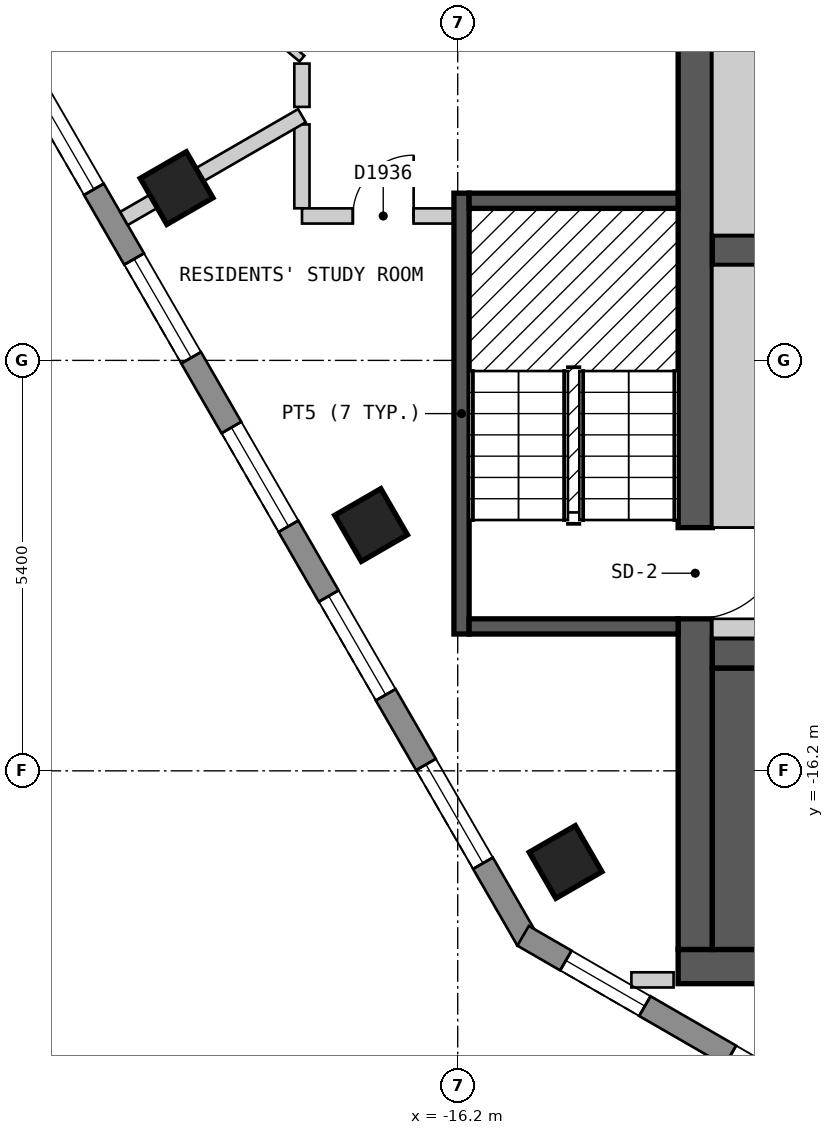
"""IFC4 building model, lengths in metres.
Left out: names, types, materials, properties, quantities, classifications, styles, units other than length and angle.
Written with IfcOpenShell. Run it as: python <this file> out.ifc"""

import sys

from ifc_helpers import new_model, si_unit, direction, frame, frame_2d, origin, origin_2d, place, context, subcontext, project, spatial, polyline, rectangle, outline, extrude, element, fill, save


model = new_model("IFC4")
c1 = context("Model", 3, precision=1e-05, world=origin(), true_north=direction((0.0, 1.0)))
c2 = subcontext(c1, "Body", "Model", "MODEL_VIEW")
j1 = project(units=[si_unit("LENGTHUNIT", "METRE"), si_unit("PLANEANGLEUNIT", "RADIAN")], contexts=[c1])
p1 = place(None, origin())
s1 = spatial("IfcSite", under=j1, at=p1, CompositionType="ELEMENT")
p2 = place(p1, origin())
s2 = spatial("IfcBuilding", under=s1, at=p2, CompositionType="ELEMENT")
p3 = place(p2, frame((0.0, 0.0, 220.8)))
s3 = spatial("IfcBuildingStorey", under=s2, at=p3, CompositionType="ELEMENT", Elevation=220.8)
for number, where, z_axis, x_axis in (
    (1, (-19.899, -8.533, 0.0), (0.0, 0.0, 1.0), (0.5, -0.866, 0.0)),
    (2, (-17.34, -12.966, 0.0), (0.0, 0.0, 1.0), (0.5, -0.866, 0.0)),
    (3, (-14.781, -17.399, 0.0), (0.0, 0.0, 1.0), (0.5, -0.866, 0.0)),
):
    element("IfcColumn", number, at=place(p3, frame(where, z_axis=z_axis, x_axis=x_axis)), inside=s3, PredefinedType="COLUMN", context=c2, shape_type="SweptSolid", body=[
        extrude(rectangle(XDim=0.7, YDim=0.7, at=origin_2d()), origin(), (0.0, 0.0, 1.0), 3.0),
    ])
p4 = place(p3, frame((-13.3, -18.775, 0.0), z_axis=(0.0, 0.0, 1.0), x_axis=(1.0, 0.0, 0.0)))
e4 = element("IfcWall", 4, at=p4, inside=s3, PredefinedType="SHEAR", context=c2, shape_type="SweptSolid", body=[
    extrude(rectangle(XDim=26.6, YDim=0.45, at=frame_2d((13.3, 0.0))), origin(), (0.0, 0.0, 1.0), 2.7),
])
p5 = place(p4, frame((9.3, 0.0, 0.0)))
e5 = element("IfcOpeningElement", 5, at=p5, cuts=e4, PredefinedType="OPENING", context=c2, shape_type="SweptSolid", body=[
    extrude(rectangle(XDim=0.9, YDim=2.1, at=frame_2d((0.45, 1.05))), frame((0.0, 0.235, 0.0), z_axis=(0.0, -1.0, 0.0), x_axis=(1.0, 0.0, 0.0)), (0.0, 0.0, 1.0), 0.47),
])
p6 = place(p3, frame((-13.075, -18.55, 0.0), z_axis=(0.0, 0.0, 1.0), x_axis=(0.0, 1.0, 0.0)))
e6 = element("IfcWall", 6, at=p6, inside=s3, PredefinedType="SHEAR", context=c2, shape_type="SweptSolid", body=[
    extrude(rectangle(XDim=13.1, YDim=0.45, at=frame_2d((6.55, 0.0))), origin(), (0.0, 0.0, 1.0), 2.7),
])
p7 = place(p6, frame((4.35, 0.0, 0.0)))
e7 = element("IfcOpeningElement", 7, at=p7, cuts=e6, PredefinedType="OPENING", context=c2, shape_type="SweptSolid", body=[
    extrude(rectangle(XDim=1.2, YDim=2.1, at=frame_2d((0.6, 1.05))), frame((0.0, 0.235, 0.0), z_axis=(0.0, -1.0, 0.0), x_axis=(1.0, 0.0, 0.0)), (0.0, 0.0, 1.0), 0.47),
])
p8 = place(p3, frame((-12.85, -14.65, 0.0), z_axis=(0.0, 0.0, 1.0), x_axis=(1.0, 0.0, 0.0)))
e8 = element("IfcWall", 8, at=p8, inside=s3, PredefinedType="SHEAR", context=c2, shape_type="SweptSolid", body=[
    extrude(rectangle(XDim=25.7, YDim=0.4, at=frame_2d((12.85, 0.0))), origin(), (0.0, 0.0, 1.0), 2.7),
])
p9 = place(p8, frame((2.05, 0.0, 0.0), z_axis=(0.0, 0.0, 1.0), x_axis=(-1.0, 0.0, 0.0)))
e9 = element("IfcOpeningElement", 9, at=p9, cuts=e8, PredefinedType="OPENING", context=c2, shape_type="SweptSolid", body=[
    extrude(rectangle(XDim=1.2, YDim=2.1, at=frame_2d((0.6, 1.05))), frame((0.0, 0.21, 0.0), z_axis=(0.0, -1.0, 0.0), x_axis=(1.0, 0.0, 0.0)), (0.0, 0.0, 1.0), 0.42),
])
p10 = place(p8, frame((24.9, 0.0, 0.0), z_axis=(0.0, 0.0, 1.0), x_axis=(-1.0, 0.0, 0.0)))
e10 = element("IfcOpeningElement", 10, at=p10, cuts=e8, PredefinedType="OPENING", context=c2, shape_type="SweptSolid", body=[
    extrude(rectangle(XDim=1.2, YDim=2.1, at=frame_2d((0.6, 1.05))), frame((0.0, 0.21, 0.0), z_axis=(0.0, -1.0, 0.0), x_axis=(1.0, 0.0, 0.0)), (0.0, 0.0, 1.0), 0.42),
])
p11 = place(p8, frame((8.75, 0.0, 0.0), z_axis=(0.0, 0.0, 1.0), x_axis=(-1.0, 0.0, 0.0)))
e11 = element("IfcOpeningElement", 11, at=p11, cuts=e8, PredefinedType="OPENING", context=c2, shape_type="SweptSolid", body=[
    extrude(rectangle(XDim=1.0, YDim=2.1, at=frame_2d((0.5, 1.05))), frame((0.0, 0.21, 0.0), z_axis=(0.0, -1.0, 0.0), x_axis=(1.0, 0.0, 0.0)), (0.0, 0.0, 1.0), 0.42),
])
p12 = place(p8, frame((11.5, 0.0, 0.0), z_axis=(0.0, 0.0, 1.0), x_axis=(-1.0, 0.0, 0.0)))
e12 = element("IfcOpeningElement", 12, at=p12, cuts=e8, PredefinedType="OPENING", context=c2, shape_type="SweptSolid", body=[
    extrude(rectangle(XDim=0.9, YDim=2.1, at=frame_2d((0.45, 1.05))), frame((0.0, 0.21, 0.0), z_axis=(0.0, -1.0, 0.0), x_axis=(1.0, 0.0, 0.0)), (0.0, 0.0, 1.0), 0.42),
])
p13 = place(p8, frame((14.3, 0.0, 0.0), z_axis=(0.0, 0.0, 1.0), x_axis=(-1.0, 0.0, 0.0)))
e13 = element("IfcOpeningElement", 13, at=p13, cuts=e8, PredefinedType="OPENING", context=c2, shape_type="SweptSolid", body=[
    extrude(rectangle(XDim=1.0, YDim=2.1, at=frame_2d((0.5, 1.05))), frame((0.0, 0.21, 0.0), z_axis=(0.0, -1.0, 0.0), x_axis=(1.0, 0.0, 0.0)), (0.0, 0.0, 1.0), 0.42),
])
p14 = place(p8, frame((17.9, 0.0, 0.0), z_axis=(0.0, 0.0, 1.0), x_axis=(-1.0, 0.0, 0.0)))
e14 = element("IfcOpeningElement", 14, at=p14, cuts=e8, PredefinedType="OPENING", context=c2, shape_type="SweptSolid", body=[
    extrude(rectangle(XDim=1.0, YDim=2.1, at=frame_2d((0.5, 1.05))), frame((0.0, 0.21, 0.0), z_axis=(0.0, -1.0, 0.0), x_axis=(1.0, 0.0, 0.0)), (0.0, 0.0, 1.0), 0.42),
])
p15 = place(p3, frame((-12.85, -9.35, 0.0), z_axis=(0.0, 0.0, 1.0), x_axis=(1.0, 0.0, 0.0)))
e15 = element("IfcWall", 15, at=p15, inside=s3, PredefinedType="SHEAR", context=c2, shape_type="SweptSolid", body=[
    extrude(rectangle(XDim=23.05, YDim=0.4, at=frame_2d((11.525, 0.0))), origin(), (0.0, 0.0, 1.0), 2.7),
])
p16 = place(p15, frame((1.45, 0.0, 0.0)))
e16 = element("IfcOpeningElement", 16, at=p16, cuts=e15, PredefinedType="OPENING", context=c2, shape_type="SweptSolid", body=[
    extrude(rectangle(XDim=1.1, YDim=2.1, at=frame_2d((0.55, 1.05))), frame((0.0, 0.21, 0.0), z_axis=(0.0, -1.0, 0.0), x_axis=(1.0, 0.0, 0.0)), (0.0, 0.0, 1.0), 0.42),
])
p17 = place(p15, frame((4.25, 0.0, 0.0)))
e17 = element("IfcOpeningElement", 17, at=p17, cuts=e15, PredefinedType="OPENING", context=c2, shape_type="SweptSolid", body=[
    extrude(rectangle(XDim=1.1, YDim=2.1, at=frame_2d((0.55, 1.05))), frame((0.0, 0.21, 0.0), z_axis=(0.0, -1.0, 0.0), x_axis=(1.0, 0.0, 0.0)), (0.0, 0.0, 1.0), 0.42),
])
p18 = place(p15, frame((7.05, 0.0, 0.0)))
e18 = element("IfcOpeningElement", 18, at=p18, cuts=e15, PredefinedType="OPENING", context=c2, shape_type="SweptSolid", body=[
    extrude(rectangle(XDim=1.1, YDim=2.1, at=frame_2d((0.55, 1.05))), frame((0.0, 0.21, 0.0), z_axis=(0.0, -1.0, 0.0), x_axis=(1.0, 0.0, 0.0)), (0.0, 0.0, 1.0), 0.42),
])
p19 = place(p15, frame((9.35, 0.0, 0.0)))
e19 = element("IfcOpeningElement", 19, at=p19, cuts=e15, PredefinedType="OPENING", context=c2, shape_type="SweptSolid", body=[
    extrude(rectangle(XDim=1.1, YDim=2.1, at=frame_2d((0.55, 1.05))), frame((0.0, 0.21, 0.0), z_axis=(0.0, -1.0, 0.0), x_axis=(1.0, 0.0, 0.0)), (0.0, 0.0, 1.0), 0.42),
])
p20 = place(p15, frame((11.65, 0.0, 0.0)))
e20 = element("IfcOpeningElement", 20, at=p20, cuts=e15, PredefinedType="OPENING", context=c2, shape_type="SweptSolid", body=[
    extrude(rectangle(XDim=1.1, YDim=2.1, at=frame_2d((0.55, 1.05))), frame((0.0, 0.21, 0.0), z_axis=(0.0, -1.0, 0.0), x_axis=(1.0, 0.0, 0.0)), (0.0, 0.0, 1.0), 0.42),
])
p21 = place(p15, frame((13.95, 0.0, 0.0)))
e21 = element("IfcOpeningElement", 21, at=p21, cuts=e15, PredefinedType="OPENING", context=c2, shape_type="SweptSolid", body=[
    extrude(rectangle(XDim=1.1, YDim=2.1, at=frame_2d((0.55, 1.05))), frame((0.0, 0.21, 0.0), z_axis=(0.0, -1.0, 0.0), x_axis=(1.0, 0.0, 0.0)), (0.0, 0.0, 1.0), 0.42),
])
p22 = place(p15, frame((16.25, 0.0, 0.0)))
e22 = element("IfcOpeningElement", 22, at=p22, cuts=e15, PredefinedType="OPENING", context=c2, shape_type="SweptSolid", body=[
    extrude(rectangle(XDim=1.1, YDim=2.1, at=frame_2d((0.55, 1.05))), frame((0.0, 0.21, 0.0), z_axis=(0.0, -1.0, 0.0), x_axis=(1.0, 0.0, 0.0)), (0.0, 0.0, 1.0), 0.42),
])
p23 = place(p15, frame((18.55, 0.0, 0.0)))
e23 = element("IfcOpeningElement", 23, at=p23, cuts=e15, PredefinedType="OPENING", context=c2, shape_type="SweptSolid", body=[
    extrude(rectangle(XDim=1.1, YDim=2.1, at=frame_2d((0.55, 1.05))), frame((0.0, 0.21, 0.0), z_axis=(0.0, -1.0, 0.0), x_axis=(1.0, 0.0, 0.0)), (0.0, 0.0, 1.0), 0.42),
])
p24 = place(p15, frame((20.95, 0.0, 0.0)))
e24 = element("IfcOpeningElement", 24, at=p24, cuts=e15, PredefinedType="OPENING", context=c2, shape_type="SweptSolid", body=[
    extrude(rectangle(XDim=1.1, YDim=2.1, at=frame_2d((0.55, 1.05))), frame((0.0, 0.21, 0.0), z_axis=(0.0, -1.0, 0.0), x_axis=(1.0, 0.0, 0.0)), (0.0, 0.0, 1.0), 0.42),
])
p25 = place(p3, frame((-23.599, -4.025, 0.0), z_axis=(0.0, 0.0, 1.0), x_axis=(0.500012653391, -0.866018098222, 0.0)))
e25 = element("IfcWall", 25, at=p25, inside=s3, PredefinedType="SOLIDWALL", context=c2, shape_type="SweptSolid", body=[
    extrude(outline(polyline([(0.0, -0.15), (16.628, -0.15), (16.548, 0.15), (0.08, 0.15), (0.0, -0.15)])), origin(), (0.0, 0.0, 1.0), 2.7),
])
p26 = place(p25, frame((1.164, 0.0, 0.15)))
e26 = element("IfcOpeningElement", 26, at=p26, cuts=e25, PredefinedType="OPENING", context=c2, shape_type="SweptSolid", body=[
    extrude(rectangle(XDim=1.5, YDim=2.1, at=frame_2d((0.75, 1.05))), frame((0.0, 0.16, 0.0), z_axis=(0.0, -1.0, 0.0), x_axis=(1.0, 0.0, 0.0)), (0.0, 0.0, 1.0), 0.32),
])
p27 = place(p25, frame((3.724, 0.0, 0.15)))
e27 = element("IfcOpeningElement", 27, at=p27, cuts=e25, PredefinedType="OPENING", context=c2, shape_type="SweptSolid", body=[
    extrude(rectangle(XDim=1.5, YDim=2.1, at=frame_2d((0.75, 1.05))), frame((0.0, 0.16, 0.0), z_axis=(0.0, -1.0, 0.0), x_axis=(1.0, 0.0, 0.0)), (0.0, 0.0, 1.0), 0.32),
])
p28 = place(p25, frame((6.283, 0.0, 0.15)))
e28 = element("IfcOpeningElement", 28, at=p28, cuts=e25, PredefinedType="OPENING", context=c2, shape_type="SweptSolid", body=[
    extrude(rectangle(XDim=1.5, YDim=2.1, at=frame_2d((0.75, 1.05))), frame((0.0, 0.16, 0.0), z_axis=(0.0, -1.0, 0.0), x_axis=(1.0, 0.0, 0.0)), (0.0, 0.0, 1.0), 0.32),
])
p29 = place(p25, frame((8.843, 0.0, 0.15)))
e29 = element("IfcOpeningElement", 29, at=p29, cuts=e25, PredefinedType="OPENING", context=c2, shape_type="SweptSolid", body=[
    extrude(rectangle(XDim=1.5, YDim=2.1, at=frame_2d((0.75, 1.05))), frame((0.0, 0.16, 0.0), z_axis=(0.0, -1.0, 0.0), x_axis=(1.0, 0.0, 0.0)), (0.0, 0.0, 1.0), 0.32),
])
p30 = place(p25, frame((11.403, 0.0, 0.15)))
e30 = element("IfcOpeningElement", 30, at=p30, cuts=e25, PredefinedType="OPENING", context=c2, shape_type="SweptSolid", body=[
    extrude(rectangle(XDim=1.5, YDim=2.1, at=frame_2d((0.75, 1.05))), frame((0.0, 0.16, 0.0), z_axis=(0.0, -1.0, 0.0), x_axis=(1.0, 0.0, 0.0)), (0.0, 0.0, 1.0), 0.32),
])
p31 = place(p25, frame((13.962, 0.0, 0.15)))
e31 = element("IfcOpeningElement", 31, at=p31, cuts=e25, PredefinedType="OPENING", context=c2, shape_type="SweptSolid", body=[
    extrude(rectangle(XDim=1.5, YDim=2.1, at=frame_2d((0.75, 1.05))), frame((0.0, 0.16, 0.0), z_axis=(0.0, -1.0, 0.0), x_axis=(1.0, 0.0, 0.0)), (0.0, 0.0, 1.0), 0.32),
])
p32 = place(p3, frame((-15.34, -18.37, 0.0), z_axis=(0.0, 0.0, 1.0), x_axis=(0.866022959057, -0.500004234368, 0.0)))
e32 = element("IfcWall", 32, at=p32, inside=s3, PredefinedType="SOLIDWALL", context=c2, shape_type="SweptSolid", body=[
    extrude(outline(polyline([(0.0, -0.15), (5.0, -0.15), (4.92, 0.15), (0.08, 0.15), (0.0, -0.15)])), origin(), (0.0, 0.0, 1.0), 2.7),
])
p33 = place(p32, frame((0.65, 0.0, 0.15)))
e33 = element("IfcOpeningElement", 33, at=p33, cuts=e32, PredefinedType="OPENING", context=c2, shape_type="SweptSolid", body=[
    extrude(rectangle(XDim=1.2, YDim=2.1, at=frame_2d((0.6, 1.05))), frame((0.0, 0.16, 0.0), z_axis=(0.0, -1.0, 0.0), x_axis=(1.0, 0.0, 0.0)), (0.0, 0.0, 1.0), 0.32),
])
p34 = place(p32, frame((3.15, 0.0, 0.15)))
e34 = element("IfcOpeningElement", 34, at=p34, cuts=e32, PredefinedType="OPENING", context=c2, shape_type="SweptSolid", body=[
    extrude(rectangle(XDim=1.2, YDim=2.1, at=frame_2d((0.6, 1.05))), frame((0.0, 0.16, 0.0), z_axis=(0.0, -1.0, 0.0), x_axis=(1.0, 0.0, 0.0)), (0.0, 0.0, 1.0), 0.32),
])
p35 = place(p3, frame((-18.25, -7.696, 0.0), z_axis=(0.0, 0.0, 1.0), x_axis=(0.0, -1.0, 0.0)))
e35 = element("IfcWall", 35, at=p35, inside=s3, PredefinedType="PARTITIONING", context=c2, shape_type="SweptSolid", body=[
    extrude(rectangle(XDim=1.103, YDim=0.2, at=frame_2d((0.552, 0.0))), origin(), (0.0, 0.0, 1.0), 2.7),
])
p36 = place(p3, frame((-18.249, -8.9, 0.0), z_axis=(0.0, 0.0, 1.0), x_axis=(1.0, 0.0, 0.0)))
e36 = element("IfcWall", 36, at=p36, inside=s3, PredefinedType="PARTITIONING", context=c2, shape_type="SweptSolid", body=[
    extrude(rectangle(XDim=2.199, YDim=0.2, at=frame_2d((1.1, 0.0))), origin(), (0.0, 0.0, 1.0), 2.7),
])
p37 = place(p36, frame((0.669, 0.0, 0.0)))
e37 = element("IfcOpeningElement", 37, at=p37, cuts=e36, PredefinedType="OPENING", context=c2, shape_type="SweptSolid", body=[
    extrude(rectangle(XDim=0.8, YDim=2.1, at=frame_2d((0.4, 1.05))), frame((0.0, 0.11, 0.0), z_axis=(0.0, -1.0, 0.0), x_axis=(1.0, 0.0, 0.0)), (0.0, 0.0, 1.0), 0.22),
])
p38 = place(p3, frame((-18.25, -7.465, 0.0), z_axis=(0.0, 0.0, 1.0), x_axis=(0.0, 1.0, 0.0)))
e38 = element("IfcWall", 38, at=p38, inside=s3, PredefinedType="PARTITIONING", context=c2, shape_type="SweptSolid", body=[
    extrude(rectangle(XDim=0.57, YDim=0.2, at=frame_2d((0.285, 0.0))), origin(), (0.0, 0.0, 1.0), 2.7),
])
p39 = place(p3, frame((-20.15, -5.223, 0.0), z_axis=(0.0, 0.0, 1.0), x_axis=(0.763471868926, -0.645841083672, 0.0)))
e39 = element("IfcWall", 39, at=p39, inside=s3, PredefinedType="PARTITIONING", context=c2, shape_type="SweptSolid", body=[
    extrude(rectangle(XDim=2.489, YDim=0.1, at=frame_2d((1.244, 0.0))), origin(), (0.0, 0.0, 1.0), 2.7),
])
p40 = place(p3, frame((-13.915, -18.95, 0.0), z_axis=(0.0, 0.0, 1.0), x_axis=(1.0, 0.0, 0.0)))
e40 = element("IfcWall", 40, at=p40, inside=s3, PredefinedType="PARTITIONING", context=c2, shape_type="SweptSolid", body=[
    extrude(rectangle(XDim=0.555, YDim=0.2, at=frame_2d((0.277, 0.0))), origin(), (0.0, 0.0, 1.0), 2.7),
])
p41 = place(p3, frame((-20.592, -8.933, 0.0), z_axis=(0.0, 0.0, 1.0), x_axis=(0.866045775131, 0.499964714133, 0.0)))
e41 = element("IfcWall", 41, at=p41, inside=s3, PredefinedType="PARTITIONING", context=c2, shape_type="SweptSolid", body=[
    extrude(rectangle(XDim=2.704, YDim=0.2, at=frame_2d((1.352, 0.0))), origin(), (0.0, 0.0, 1.0), 2.7),
])
p42 = place(p3, frame((-16.15, -14.4, 0.0), z_axis=(0.0, 0.0, 1.0), x_axis=(0.0, 1.0, 0.0)))
e42 = element("IfcWall", 42, at=p42, inside=s3, PredefinedType="SOLIDWALL", context=c2, shape_type="SweptSolid", body=[
    extrude(rectangle(XDim=5.8, YDim=0.2, at=frame_2d((2.9, 0.0))), origin(), (0.0, 0.0, 1.0), 2.7),
])
for number, where, z_axis, x_axis in (
    (43, (-16.05, -14.3, 0.0), (0.0, 0.0, 1.0), (1.0, 0.0, 0.0)),
    (44, (-16.05, -8.7, 0.0), (0.0, 0.0, 1.0), (1.0, 0.0, 0.0)),
):
    element("IfcWall", number, at=place(p3, frame(where, z_axis=z_axis, x_axis=x_axis)), inside=s3, PredefinedType="SOLIDWALL", context=c2, shape_type="SweptSolid", body=[
        extrude(rectangle(XDim=2.75, YDim=0.2, at=frame_2d((1.375, 0.0))), origin(), (0.0, 0.0, 1.0), 2.7),
    ])
p43 = place(p3, frame((-12.475, -18.55, 0.0), z_axis=(0.0, 0.0, 1.0), x_axis=(0.0, 1.0, 0.0)))
e45 = element("IfcWall", 45, at=p43, inside=s3, PredefinedType="SOLIDWALL", context=c2, shape_type="SweptSolid", body=[
    extrude(rectangle(XDim=3.7, YDim=0.75, at=frame_2d((1.85, 0.0))), origin(), (0.0, 0.0, 1.0), 2.7),
])
p44 = place(p3, frame((-12.85, -14.325, 0.0), z_axis=(0.0, 0.0, 1.0), x_axis=(1.0, 0.0, 0.0)))
e46 = element("IfcWall", 46, at=p44, inside=s3, PredefinedType="PARTITIONING", context=c2, shape_type="SweptSolid", body=[
    extrude(rectangle(XDim=0.75, YDim=0.25, at=frame_2d((0.375, 0.0))), origin(), (0.0, 0.0, 1.0), 2.7),
])
p45 = place(p3, frame((-12.475, -13.0, 0.0), z_axis=(0.0, 0.0, 1.0), x_axis=(0.0, 1.0, 0.0)))
e47 = element("IfcWall", 47, at=p45, inside=s3, PredefinedType="PARTITIONING", context=c2, shape_type="SweptSolid", body=[
    extrude(rectangle(XDim=3.45, YDim=0.75, at=frame_2d((1.725, 0.0))), origin(), (0.0, 0.0, 1.0), 2.7),
])
p46 = place(p3, frame((-12.475, -9.15, 0.0), z_axis=(0.0, 0.0, 1.0), x_axis=(0.0, 1.0, 0.0)))
e48 = element("IfcWall", 48, at=p46, inside=s3, PredefinedType="SOLIDWALL", context=c2, shape_type="SweptSolid", body=[
    extrude(rectangle(XDim=3.7, YDim=0.75, at=frame_2d((1.85, 0.0))), origin(), (0.0, 0.0, 1.0), 2.7),
])
p47 = place(p27, origin())
e49 = element("IfcWindow", 49, at=p47, inside=s3, PartitioningType="SINGLE_PANEL", PredefinedType="WINDOW", context=c2, shape_type="SweptSolid", body=[
    extrude(rectangle(XDim=1.5, YDim=2.1, at=frame_2d((0.75, 1.05))), frame((0.0, 0.03, 0.0), z_axis=(0.0, -1.0, 0.0), x_axis=(1.0, 0.0, 0.0)), (0.0, 0.0, 1.0), 0.06),
])
fill(e27, e49)
p48 = place(p28, origin())
e50 = element("IfcWindow", 50, at=p48, inside=s3, PartitioningType="SINGLE_PANEL", PredefinedType="WINDOW", context=c2, shape_type="SweptSolid", body=[
    extrude(rectangle(XDim=1.5, YDim=2.1, at=frame_2d((0.75, 1.05))), frame((0.0, 0.03, 0.0), z_axis=(0.0, -1.0, 0.0), x_axis=(1.0, 0.0, 0.0)), (0.0, 0.0, 1.0), 0.06),
])
fill(e28, e50)
p49 = place(p29, origin())
e51 = element("IfcWindow", 51, at=p49, inside=s3, PartitioningType="SINGLE_PANEL", PredefinedType="WINDOW", context=c2, shape_type="SweptSolid", body=[
    extrude(rectangle(XDim=1.5, YDim=2.1, at=frame_2d((0.75, 1.05))), frame((0.0, 0.03, 0.0), z_axis=(0.0, -1.0, 0.0), x_axis=(1.0, 0.0, 0.0)), (0.0, 0.0, 1.0), 0.06),
])
fill(e29, e51)
p50 = place(p30, origin())
e52 = element("IfcWindow", 52, at=p50, inside=s3, PartitioningType="SINGLE_PANEL", PredefinedType="WINDOW", context=c2, shape_type="SweptSolid", body=[
    extrude(rectangle(XDim=1.5, YDim=2.1, at=frame_2d((0.75, 1.05))), frame((0.0, 0.03, 0.0), z_axis=(0.0, -1.0, 0.0), x_axis=(1.0, 0.0, 0.0)), (0.0, 0.0, 1.0), 0.06),
])
fill(e30, e52)
p51 = place(p31, origin())
e53 = element("IfcWindow", 53, at=p51, inside=s3, PartitioningType="SINGLE_PANEL", PredefinedType="WINDOW", context=c2, shape_type="SweptSolid", body=[
    extrude(rectangle(XDim=1.5, YDim=2.1, at=frame_2d((0.75, 1.05))), frame((0.0, 0.03, 0.0), z_axis=(0.0, -1.0, 0.0), x_axis=(1.0, 0.0, 0.0)), (0.0, 0.0, 1.0), 0.06),
])
fill(e31, e53)
p52 = place(p33, origin())
e54 = element("IfcWindow", 54, at=p52, inside=s3, PartitioningType="SINGLE_PANEL", PredefinedType="WINDOW", context=c2, shape_type="SweptSolid", body=[
    extrude(rectangle(XDim=1.2, YDim=2.1, at=frame_2d((0.6, 1.05))), frame((0.0, 0.03, 0.0), z_axis=(0.0, -1.0, 0.0), x_axis=(1.0, 0.0, 0.0)), (0.0, 0.0, 1.0), 0.06),
])
fill(e33, e54)
p53 = place(p34, origin())
e55 = element("IfcWindow", 55, at=p53, inside=s3, PartitioningType="SINGLE_PANEL", PredefinedType="WINDOW", context=c2, shape_type="SweptSolid", body=[
    extrude(rectangle(XDim=1.2, YDim=2.1, at=frame_2d((0.6, 1.05))), frame((0.0, 0.03, 0.0), z_axis=(0.0, -1.0, 0.0), x_axis=(1.0, 0.0, 0.0)), (0.0, 0.0, 1.0), 0.06),
])
fill(e34, e55)
p54 = place(p37, origin())
e56 = element("IfcDoor", 56, at=p54, inside=s3, OperationType="SINGLE_SWING_RIGHT", PredefinedType="DOOR", context=c2, shape_type="SweptSolid", body=[
    extrude(rectangle(XDim=0.8, YDim=2.1, at=frame_2d((0.4, 1.05))), frame((0.0, 0.025, 0.0), z_axis=(0.0, -1.0, 0.0), x_axis=(1.0, 0.0, 0.0)), (0.0, 0.0, 1.0), 0.05),
])
fill(e37, e56)
p55 = place(p7, origin())
e57 = element("IfcDoor", 57, at=p55, inside=s3, OperationType="SINGLE_SWING_RIGHT", PredefinedType="DOOR", context=c2, shape_type="SweptSolid", body=[
    extrude(rectangle(XDim=1.2, YDim=2.1, at=frame_2d((0.6, 1.05))), frame((0.0, 0.025, 0.0), z_axis=(0.0, -1.0, 0.0), x_axis=(1.0, 0.0, 0.0)), (0.0, 0.0, 1.0), 0.05),
])
fill(e7, e57)
save(model, sys.argv[1])
